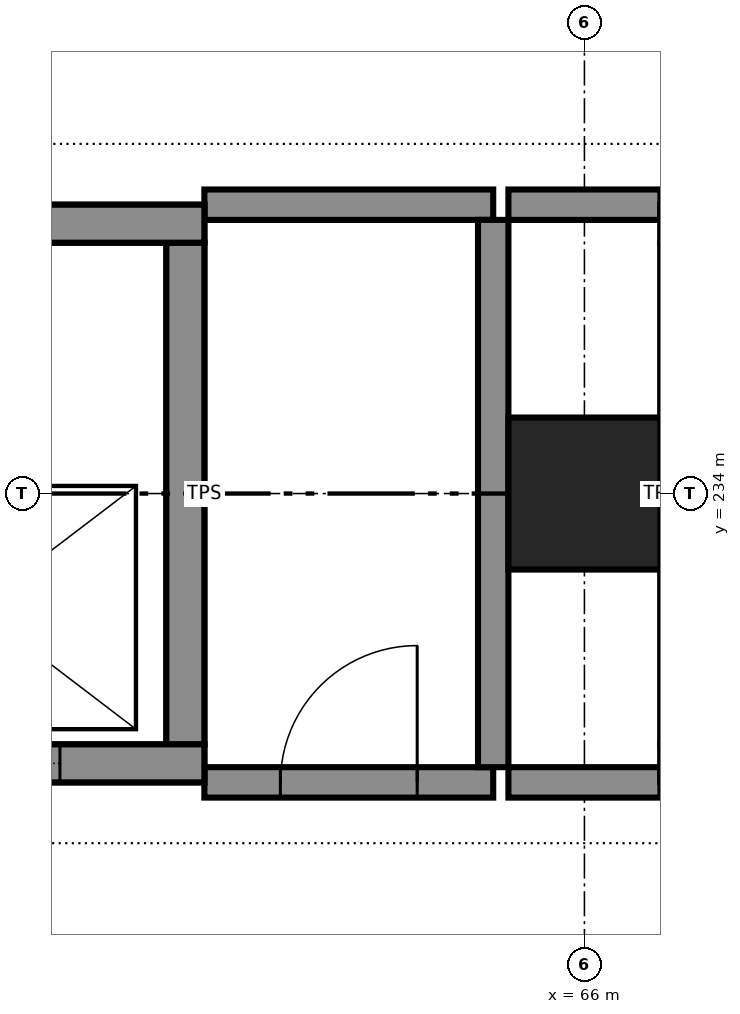
"""IFC4 building model, lengths in metres.
Left out: names, types, materials, properties, quantities, classifications, styles, units other than length and angle.
Written with IfcOpenShell. Run it as: python <this file> out.ifc"""

import sys

from ifc_helpers import new_model, si_unit, direction, frame, frame_2d, origin, origin_2d, place, context, subcontext, project, spatial, rectangle, extrude, element, fill, save


model = new_model("IFC4")
c1 = context("Model", 3, precision=1e-05, world=origin(), true_north=direction((0.0, 1.0)))
c2 = subcontext(c1, "Body", "Model", "MODEL_VIEW")
j1 = project(units=[si_unit("LENGTHUNIT", "METRE"), si_unit("PLANEANGLEUNIT", "RADIAN")], contexts=[c1])
p1 = place(None, origin())
s1 = spatial("IfcSite", under=j1, at=p1, CompositionType="ELEMENT")
p2 = place(p1, origin())
s2 = spatial("IfcBuilding", under=s1, at=p2, CompositionType="ELEMENT")
p3 = place(p2, frame((0.0, 0.0, -6.0)))
s3 = spatial("IfcBuildingStorey", under=s2, at=p3, CompositionType="ELEMENT", Elevation=-6.0)
p4 = place(p3, frame((66.0, 234.0, -0.4), z_axis=(0.0, 0.0, 1.0), x_axis=(1.0, 0.0, 0.0)))
e1 = element("IfcColumn", 1, at=p4, inside=s3, PredefinedType="COLUMN", context=c2, shape_type="SweptSolid", body=[
    extrude(rectangle(XDim=1.0, YDim=1.0, at=origin_2d()), origin(), (0.0, 0.0, 1.0), 6.4),
])
p5 = place(p3, frame((60.5, 232.225, 0.0), z_axis=(0.0, 0.0, 1.0), x_axis=(1.0, 0.0, 0.0)))
e2 = element("IfcWall", 2, at=p5, inside=s3, PredefinedType="SHEAR", context=c2, shape_type="SweptSolid", body=[
    extrude(rectangle(XDim=3.0, YDim=0.25, at=frame_2d((1.5, 0.0))), origin(), (0.0, 0.0, 1.0), 6.0),
])
p6 = place(p5, frame((0.95, 0.0, 0.0)))
e3 = element("IfcOpeningElement", 3, at=p6, cuts=e2, PredefinedType="OPENING", context=c2, shape_type="SweptSolid", body=[
    extrude(rectangle(XDim=1.1, YDim=2.1, at=frame_2d((0.55, 1.05))), frame((0.0, 0.135, 0.0), z_axis=(0.0, -1.0, 0.0), x_axis=(1.0, 0.0, 0.0)), (0.0, 0.0, 1.0), 0.27),
])
p7 = place(p3, frame((60.5, 235.775, 0.0), z_axis=(0.0, 0.0, 1.0), x_axis=(1.0, 0.0, 0.0)))
e4 = element("IfcWall", 4, at=p7, inside=s3, PredefinedType="SHEAR", context=c2, shape_type="SweptSolid", body=[
    extrude(rectangle(XDim=3.0, YDim=0.25, at=frame_2d((1.5, 0.0))), origin(), (0.0, 0.0, 1.0), 6.0),
])
p8 = place(p3, frame((63.375, 232.35, 0.0), z_axis=(0.0, 0.0, 1.0), x_axis=(0.0, 1.0, 0.0)))
e5 = element("IfcWall", 5, at=p8, inside=s3, PredefinedType="SHEAR", context=c2, shape_type="SweptSolid", body=[
    extrude(rectangle(XDim=3.3, YDim=0.25, at=frame_2d((1.65, 0.0))), origin(), (0.0, 0.0, 1.0), 6.0),
])
p9 = place(p3, frame((63.5, 232.1, 0.0), z_axis=(0.0, 0.0, 1.0), x_axis=(1.0, 0.0, 0.0)))
e6 = element("IfcWall", 6, at=p9, inside=s3, PredefinedType="PARTITIONING", context=c2, shape_type="SweptSolid", body=[
    extrude(rectangle(XDim=1.9, YDim=0.2, at=frame_2d((0.95, 0.0))), origin(), (0.0, 0.0, 1.0), 5.7),
])
p10 = place(p9, frame((0.5, 0.0, 0.0)))
e7 = element("IfcOpeningElement", 7, at=p10, cuts=e6, PredefinedType="OPENING", context=c2, shape_type="SweptSolid", body=[
    extrude(rectangle(XDim=0.9, YDim=2.1, at=frame_2d((0.45, 1.05))), frame((0.0, 0.11, 0.0), z_axis=(0.0, -1.0, 0.0), x_axis=(1.0, 0.0, 0.0)), (0.0, 0.0, 1.0), 0.22),
])
p11 = place(p3, frame((65.5, 232.1, 0.0), z_axis=(0.0, 0.0, 1.0), x_axis=(1.0, 0.0, 0.0)))
e8 = element("IfcWall", 8, at=p11, inside=s3, PredefinedType="PARTITIONING", context=c2, shape_type="SweptSolid", body=[
    extrude(rectangle(XDim=1.0, YDim=0.2, at=frame_2d((0.5, 0.0))), origin(), (0.0, 0.0, 1.0), 5.7),
])
p12 = place(p3, frame((63.5, 235.9, 0.0), z_axis=(0.0, 0.0, 1.0), x_axis=(1.0, 0.0, 0.0)))
e9 = element("IfcWall", 9, at=p12, inside=s3, PredefinedType="PARTITIONING", context=c2, shape_type="SweptSolid", body=[
    extrude(rectangle(XDim=1.9, YDim=0.2, at=frame_2d((0.95, 0.0))), origin(), (0.0, 0.0, 1.0), 5.7),
])
p13 = place(p3, frame((65.5, 235.9, 0.0), z_axis=(0.0, 0.0, 1.0), x_axis=(1.0, 0.0, 0.0)))
e10 = element("IfcWall", 10, at=p13, inside=s3, PredefinedType="PARTITIONING", context=c2, shape_type="SweptSolid", body=[
    extrude(rectangle(XDim=1.0, YDim=0.2, at=frame_2d((0.5, 0.0))), origin(), (0.0, 0.0, 1.0), 5.7),
])
p14 = place(p3, frame((65.4, 232.2, 0.0), z_axis=(0.0, 0.0, 1.0), x_axis=(0.0, 1.0, 0.0)))
e11 = element("IfcWall", 11, at=p14, inside=s3, PredefinedType="PARTITIONING", context=c2, shape_type="SweptSolid", body=[
    extrude(rectangle(XDim=3.6, YDim=0.2, at=frame_2d((1.8, 0.0))), origin(), (0.0, 0.0, 1.0), 5.7),
])
for number, where, z_axis, x_axis in (
    (12, (60.5, 232.225, -1.6), (0.0, 0.0, 1.0), (1.0, 0.0, 0.0)),
    (13, (60.5, 235.775, -1.6), (0.0, 0.0, 1.0), (1.0, 0.0, 0.0)),
):
    element("IfcWall", number, at=place(p3, frame(where, z_axis=z_axis, x_axis=x_axis)), inside=s3, PredefinedType="SOLIDWALL", context=c2, shape_type="SweptSolid", body=[
        extrude(rectangle(XDim=3.0, YDim=0.25, at=frame_2d((1.5, 0.0))), origin(), (0.0, 0.0, 1.0), 1.6),
    ])
p15 = place(p3, frame((63.375, 232.35, -1.6), z_axis=(0.0, 0.0, 1.0), x_axis=(0.0, 1.0, 0.0)))
e14 = element("IfcWall", 14, at=p15, inside=s3, PredefinedType="SOLIDWALL", context=c2, shape_type="SweptSolid", body=[
    extrude(rectangle(XDim=3.3, YDim=0.25, at=frame_2d((1.65, 0.0))), origin(), (0.0, 0.0, 1.0), 1.6),
])
p16 = place(p10, origin())
e15 = element("IfcDoor", 15, at=p16, inside=s3, OperationType="SINGLE_SWING_RIGHT", PredefinedType="DOOR", context=c2, shape_type="SweptSolid", body=[
    extrude(rectangle(XDim=0.9, YDim=2.1, at=frame_2d((0.45, 1.05))), frame((0.0, 0.025, 0.0), z_axis=(0.0, -1.0, 0.0), x_axis=(1.0, 0.0, 0.0)), (0.0, 0.0, 1.0), 0.05),
])
fill(e7, e15)
p17 = place(p6, origin())
e16 = element("IfcDoor", 16, at=p17, inside=s3, OperationType="SLIDING_TO_LEFT", PredefinedType="DOOR", context=c2, shape_type="SweptSolid", body=[
    extrude(rectangle(XDim=1.1, YDim=2.1, at=frame_2d((0.55, 1.05))), frame((0.0, 0.025, 0.0), z_axis=(0.0, -1.0, 0.0), x_axis=(1.0, 0.0, 0.0)), (0.0, 0.0, 1.0), 0.05),
])
fill(e3, e16)
save(model, sys.argv[1])
